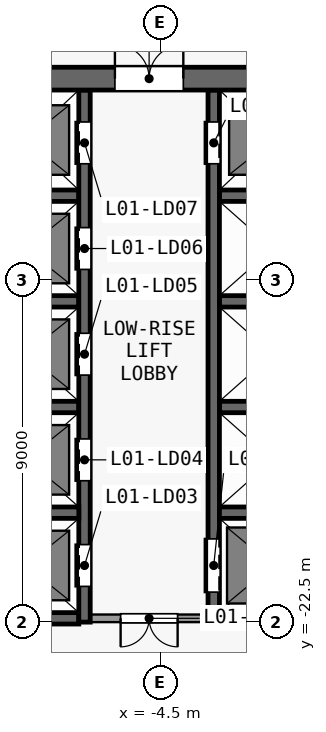
"""IFC4 building model, lengths in metres.
Left out: names, types, materials, properties, quantities, classifications, styles, units other than length and angle.
Written with IfcOpenShell. Run it as: python <this file> out.ifc"""

import sys

from ifc_helpers import new_model, si_unit, direction, frame, frame_2d, origin, place, context, subcontext, project, spatial, rectangle, extrude, element, fill, save


model = new_model("IFC4")
c1 = context("Model", 3, precision=1e-05, world=origin(), true_north=direction((0.0, 1.0)))
c2 = subcontext(c1, "Body", "Model", "MODEL_VIEW")
j1 = project(units=[si_unit("LENGTHUNIT", "METRE"), si_unit("PLANEANGLEUNIT", "RADIAN")], contexts=[c1])
p1 = place(None, origin())
s1 = spatial("IfcSite", under=j1, at=p1, CompositionType="ELEMENT")
p2 = place(p1, origin())
s2 = spatial("IfcBuilding", under=s1, at=p2, CompositionType="ELEMENT")
p3 = place(p2, frame((0.0, 0.0, 8.0)))
s3 = spatial("IfcBuildingStorey", under=s2, at=p3, CompositionType="ELEMENT", Elevation=8.0)
p4 = place(p3, frame((-13.5, -8.2, 0.0), z_axis=(0.0, 0.0, 1.0), x_axis=(1.0, 0.0, 0.0)))
e1 = element("IfcWall", 1, at=p4, inside=s3, PredefinedType="SHEAR", context=c2, shape_type="SweptSolid", body=[
    extrude(rectangle(XDim=27.0, YDim=0.6, at=frame_2d((13.5, 0.0))), origin(), (0.0, 0.0, 1.0), 5.15),
])
p5 = place(p4, frame((7.8, 0.0, 0.0)))
e2 = element("IfcOpeningElement", 2, at=p5, cuts=e1, PredefinedType="OPENING", context=c2, shape_type="SweptSolid", body=[
    extrude(rectangle(XDim=1.8, YDim=2.1, at=frame_2d((0.9, 1.05))), frame((0.0, 0.31, 0.0), z_axis=(0.0, -1.0, 0.0), x_axis=(1.0, 0.0, 0.0)), (0.0, 0.0, 1.0), 0.62),
])
p6 = place(p4, frame((17.4, 0.0, 0.0)))
e3 = element("IfcOpeningElement", 3, at=p6, cuts=e1, PredefinedType="OPENING", context=c2, shape_type="SweptSolid", body=[
    extrude(rectangle(XDim=1.8, YDim=2.1, at=frame_2d((0.9, 1.05))), frame((0.0, 0.31, 0.0), z_axis=(0.0, -1.0, 0.0), x_axis=(1.0, 0.0, 0.0)), (0.0, 0.0, 1.0), 0.62),
])
p7 = place(p4, frame((2.725, 0.0, 0.0)))
e4 = element("IfcOpeningElement", 4, at=p7, cuts=e1, PredefinedType="OPENING", context=c2, shape_type="SweptSolid", body=[
    extrude(rectangle(XDim=0.9, YDim=2.1, at=frame_2d((0.45, 1.05))), frame((0.0, 0.31, 0.0), z_axis=(0.0, -1.0, 0.0), x_axis=(1.0, 0.0, 0.0)), (0.0, 0.0, 1.0), 0.62),
])
p8 = place(p4, frame((23.375, 0.0, 0.0)))
e5 = element("IfcOpeningElement", 5, at=p8, cuts=e1, PredefinedType="OPENING", context=c2, shape_type="SweptSolid", body=[
    extrude(rectangle(XDim=0.9, YDim=2.1, at=frame_2d((0.45, 1.05))), frame((0.0, 0.31, 0.0), z_axis=(0.0, -1.0, 0.0), x_axis=(1.0, 0.0, 0.0)), (0.0, 0.0, 1.0), 0.62),
])
p9 = place(p3, frame((-9.45, -22.4, 0.0), z_axis=(0.0, 0.0, 1.0), x_axis=(1.0, 0.0, 0.0)))
e6 = element("IfcWall", 6, at=p9, inside=s3, PredefinedType="SHEAR", context=c2, shape_type="SweptSolid", body=[
    extrude(rectangle(XDim=2.8, YDim=0.3, at=frame_2d((1.4, 0.0))), origin(), (0.0, 0.0, 1.0), 5.15),
])
p10 = place(p3, frame((-3.25, -22.4, 0.0), z_axis=(0.0, 0.0, 1.0), x_axis=(-1.0, 0.0, 0.0)))
e7 = element("IfcWall", 7, at=p10, inside=s3, PredefinedType="PARTITIONING", context=c2, shape_type="SweptSolid", body=[
    extrude(rectangle(XDim=3.1, YDim=0.2, at=frame_2d((1.55, 0.0))), origin(), (0.0, 0.0, 1.0), 5.15),
])
p11 = place(p10, frame((0.8, 0.0, 0.0)))
e8 = element("IfcOpeningElement", 8, at=p11, cuts=e7, PredefinedType="OPENING", context=c2, shape_type="SweptSolid", body=[
    extrude(rectangle(XDim=1.5, YDim=2.1, at=frame_2d((0.75, 1.05))), frame((0.0, 0.11, 0.0), z_axis=(0.0, -1.0, 0.0), x_axis=(1.0, 0.0, 0.0)), (0.0, 0.0, 1.0), 0.22),
])
p12 = place(p3, frame((-2.95, -22.4, 0.0), z_axis=(0.0, 0.0, 1.0), x_axis=(1.0, 0.0, 0.0)))
e9 = element("IfcWall", 9, at=p12, inside=s3, PredefinedType="SHEAR", context=c2, shape_type="SweptSolid", body=[
    extrude(rectangle(XDim=6.2, YDim=0.3, at=frame_2d((3.1, 0.0))), origin(), (0.0, 0.0, 1.0), 5.15),
])
for number, where, z_axis, x_axis in (
    (10, (-9.45, -19.62, 0.0), (0.0, 0.0, 1.0), (1.0, 0.0, 0.0)),
    (11, (-2.95, -19.62, 0.0), (0.0, 0.0, 1.0), (1.0, 0.0, 0.0)),
    (12, (-9.45, -16.84, 0.0), (0.0, 0.0, 1.0), (1.0, 0.0, 0.0)),
    (13, (-2.95, -16.84, 0.0), (0.0, 0.0, 1.0), (1.0, 0.0, 0.0)),
    (14, (-9.45, -14.06, 0.0), (0.0, 0.0, 1.0), (1.0, 0.0, 0.0)),
    (15, (-2.95, -14.06, 0.0), (0.0, 0.0, 1.0), (1.0, 0.0, 0.0)),
    (16, (-9.45, -11.28, 0.0), (0.0, 0.0, 1.0), (1.0, 0.0, 0.0)),
    (17, (-2.95, -11.28, 0.0), (0.0, 0.0, 1.0), (1.0, 0.0, 0.0)),
):
    element("IfcWall", number, at=place(p3, frame(where, z_axis=z_axis, x_axis=x_axis)), inside=s3, PredefinedType="SHEAR", context=c2, shape_type="SweptSolid", body=[
        extrude(rectangle(XDim=2.8, YDim=0.3, at=frame_2d((1.4, 0.0))), origin(), (0.0, 0.0, 1.0), 5.15),
    ])
p13 = place(p3, frame((-6.5, -22.5, 0.0), z_axis=(0.0, 0.0, 1.0), x_axis=(0.0, 1.0, 0.0)))
e18 = element("IfcWall", 18, at=p13, inside=s3, PredefinedType="SHEAR", context=c2, shape_type="SweptSolid", body=[
    extrude(rectangle(XDim=14.0, YDim=0.3, at=frame_2d((7.0, 0.0))), origin(), (0.0, 0.0, 1.0), 5.15),
])
p14 = place(p13, frame((0.94, 0.0, 0.0)))
e19 = element("IfcOpeningElement", 19, at=p14, cuts=e18, PredefinedType="OPENING", context=c2, shape_type="SweptSolid", body=[
    extrude(rectangle(XDim=1.1, YDim=2.1, at=frame_2d((0.55, 1.05))), frame((0.0, 0.16, 0.0), z_axis=(0.0, -1.0, 0.0), x_axis=(1.0, 0.0, 0.0)), (0.0, 0.0, 1.0), 0.32),
])
p15 = place(p13, frame((3.72, 0.0, 0.0)))
e20 = element("IfcOpeningElement", 20, at=p15, cuts=e18, PredefinedType="OPENING", context=c2, shape_type="SweptSolid", body=[
    extrude(rectangle(XDim=1.1, YDim=2.1, at=frame_2d((0.55, 1.05))), frame((0.0, 0.16, 0.0), z_axis=(0.0, -1.0, 0.0), x_axis=(1.0, 0.0, 0.0)), (0.0, 0.0, 1.0), 0.32),
])
p16 = place(p13, frame((6.5, 0.0, 0.0)))
e21 = element("IfcOpeningElement", 21, at=p16, cuts=e18, PredefinedType="OPENING", context=c2, shape_type="SweptSolid", body=[
    extrude(rectangle(XDim=1.1, YDim=2.1, at=frame_2d((0.55, 1.05))), frame((0.0, 0.16, 0.0), z_axis=(0.0, -1.0, 0.0), x_axis=(1.0, 0.0, 0.0)), (0.0, 0.0, 1.0), 0.32),
])
p17 = place(p13, frame((9.28, 0.0, 0.0)))
e22 = element("IfcOpeningElement", 22, at=p17, cuts=e18, PredefinedType="OPENING", context=c2, shape_type="SweptSolid", body=[
    extrude(rectangle(XDim=1.1, YDim=2.1, at=frame_2d((0.55, 1.05))), frame((0.0, 0.16, 0.0), z_axis=(0.0, -1.0, 0.0), x_axis=(1.0, 0.0, 0.0)), (0.0, 0.0, 1.0), 0.32),
])
p18 = place(p13, frame((12.06, 0.0, 0.0)))
e23 = element("IfcOpeningElement", 23, at=p18, cuts=e18, PredefinedType="OPENING", context=c2, shape_type="SweptSolid", body=[
    extrude(rectangle(XDim=1.1, YDim=2.1, at=frame_2d((0.55, 1.05))), frame((0.0, 0.16, 0.0), z_axis=(0.0, -1.0, 0.0), x_axis=(1.0, 0.0, 0.0)), (0.0, 0.0, 1.0), 0.32),
])
p19 = place(p3, frame((-3.1, -22.55, 0.0), z_axis=(0.0, 0.0, 1.0), x_axis=(0.0, 1.0, 0.0)))
e24 = element("IfcWall", 24, at=p19, inside=s3, PredefinedType="SHEAR", context=c2, shape_type="SweptSolid", body=[
    extrude(rectangle(XDim=14.05, YDim=0.3, at=frame_2d((7.025, 0.0))), origin(), (0.0, 0.0, 1.0), 5.15),
])
p20 = place(p19, frame((12.11, 0.0, 0.0)))
e25 = element("IfcOpeningElement", 25, at=p20, cuts=e24, PredefinedType="OPENING", context=c2, shape_type="SweptSolid", body=[
    extrude(rectangle(XDim=1.1, YDim=2.1, at=frame_2d((0.55, 1.05))), frame((0.0, 0.16, 0.0), z_axis=(0.0, -1.0, 0.0), x_axis=(1.0, 0.0, 0.0)), (0.0, 0.0, 1.0), 0.32),
])
p21 = place(p19, frame((0.84, 0.0, 0.0)))
e26 = element("IfcOpeningElement", 26, at=p21, cuts=e24, PredefinedType="OPENING", context=c2, shape_type="SweptSolid", body=[
    extrude(rectangle(XDim=1.4, YDim=2.1, at=frame_2d((0.7, 1.05))), frame((0.0, 0.16, 0.0), z_axis=(0.0, -1.0, 0.0), x_axis=(1.0, 0.0, 0.0)), (0.0, 0.0, 1.0), 0.32),
])
p22 = place(p14, origin())
e27 = element("IfcDoor", 27, at=p22, inside=s3, OperationType="DOUBLE_DOOR_SLIDING", PredefinedType="DOOR", context=c2, shape_type="SweptSolid", body=[
    extrude(rectangle(XDim=1.1, YDim=2.1, at=frame_2d((0.55, 1.05))), frame((0.0, 0.025, 0.0), z_axis=(0.0, -1.0, 0.0), x_axis=(1.0, 0.0, 0.0)), (0.0, 0.0, 1.0), 0.05),
])
fill(e19, e27)
p23 = place(p15, origin())
e28 = element("IfcDoor", 28, at=p23, inside=s3, OperationType="DOUBLE_DOOR_SLIDING", PredefinedType="DOOR", context=c2, shape_type="SweptSolid", body=[
    extrude(rectangle(XDim=1.1, YDim=2.1, at=frame_2d((0.55, 1.05))), frame((0.0, 0.025, 0.0), z_axis=(0.0, -1.0, 0.0), x_axis=(1.0, 0.0, 0.0)), (0.0, 0.0, 1.0), 0.05),
])
fill(e20, e28)
p24 = place(p16, origin())
e29 = element("IfcDoor", 29, at=p24, inside=s3, OperationType="DOUBLE_DOOR_SLIDING", PredefinedType="DOOR", context=c2, shape_type="SweptSolid", body=[
    extrude(rectangle(XDim=1.1, YDim=2.1, at=frame_2d((0.55, 1.05))), frame((0.0, 0.025, 0.0), z_axis=(0.0, -1.0, 0.0), x_axis=(1.0, 0.0, 0.0)), (0.0, 0.0, 1.0), 0.05),
])
fill(e21, e29)
p25 = place(p17, origin())
e30 = element("IfcDoor", 30, at=p25, inside=s3, OperationType="DOUBLE_DOOR_SLIDING", PredefinedType="DOOR", context=c2, shape_type="SweptSolid", body=[
    extrude(rectangle(XDim=1.1, YDim=2.1, at=frame_2d((0.55, 1.05))), frame((0.0, 0.025, 0.0), z_axis=(0.0, -1.0, 0.0), x_axis=(1.0, 0.0, 0.0)), (0.0, 0.0, 1.0), 0.05),
])
fill(e22, e30)
p26 = place(p18, origin())
e31 = element("IfcDoor", 31, at=p26, inside=s3, OperationType="DOUBLE_DOOR_SLIDING", PredefinedType="DOOR", context=c2, shape_type="SweptSolid", body=[
    extrude(rectangle(XDim=1.1, YDim=2.1, at=frame_2d((0.55, 1.05))), frame((0.0, 0.025, 0.0), z_axis=(0.0, -1.0, 0.0), x_axis=(1.0, 0.0, 0.0)), (0.0, 0.0, 1.0), 0.05),
])
fill(e23, e31)
p27 = place(p20, origin())
e32 = element("IfcDoor", 32, at=p27, inside=s3, OperationType="DOUBLE_DOOR_SLIDING", PredefinedType="DOOR", context=c2, shape_type="SweptSolid", body=[
    extrude(rectangle(XDim=1.1, YDim=2.1, at=frame_2d((0.55, 1.05))), frame((0.0, 0.025, 0.0), z_axis=(0.0, -1.0, 0.0), x_axis=(1.0, 0.0, 0.0)), (0.0, 0.0, 1.0), 0.05),
])
fill(e25, e32)
p28 = place(p21, origin())
e33 = element("IfcDoor", 33, at=p28, inside=s3, OperationType="DOUBLE_DOOR_SLIDING", PredefinedType="DOOR", context=c2, shape_type="SweptSolid", body=[
    extrude(rectangle(XDim=1.4, YDim=2.1, at=frame_2d((0.7, 1.05))), frame((0.0, 0.025, 0.0), z_axis=(0.0, -1.0, 0.0), x_axis=(1.0, 0.0, 0.0)), (0.0, 0.0, 1.0), 0.05),
])
fill(e26, e33)
p29 = place(p11, origin())
e34 = element("IfcDoor", 34, at=p29, inside=s3, OperationType="DOUBLE_DOOR_SINGLE_SWING", PredefinedType="DOOR", context=c2, shape_type="SweptSolid", body=[
    extrude(rectangle(XDim=1.5, YDim=2.1, at=frame_2d((0.75, 1.05))), frame((0.0, 0.025, 0.0), z_axis=(0.0, -1.0, 0.0), x_axis=(1.0, 0.0, 0.0)), (0.0, 0.0, 1.0), 0.05),
])
fill(e8, e34)
p30 = place(p5, origin())
e35 = element("IfcDoor", 35, at=p30, inside=s3, OperationType="DOUBLE_DOOR_SINGLE_SWING", PredefinedType="DOOR", context=c2, shape_type="SweptSolid", body=[
    extrude(rectangle(XDim=1.8, YDim=2.1, at=frame_2d((0.9, 1.05))), frame((0.0, 0.025, 0.0), z_axis=(0.0, -1.0, 0.0), x_axis=(1.0, 0.0, 0.0)), (0.0, 0.0, 1.0), 0.05),
])
fill(e2, e35)
save(model, sys.argv[1])
